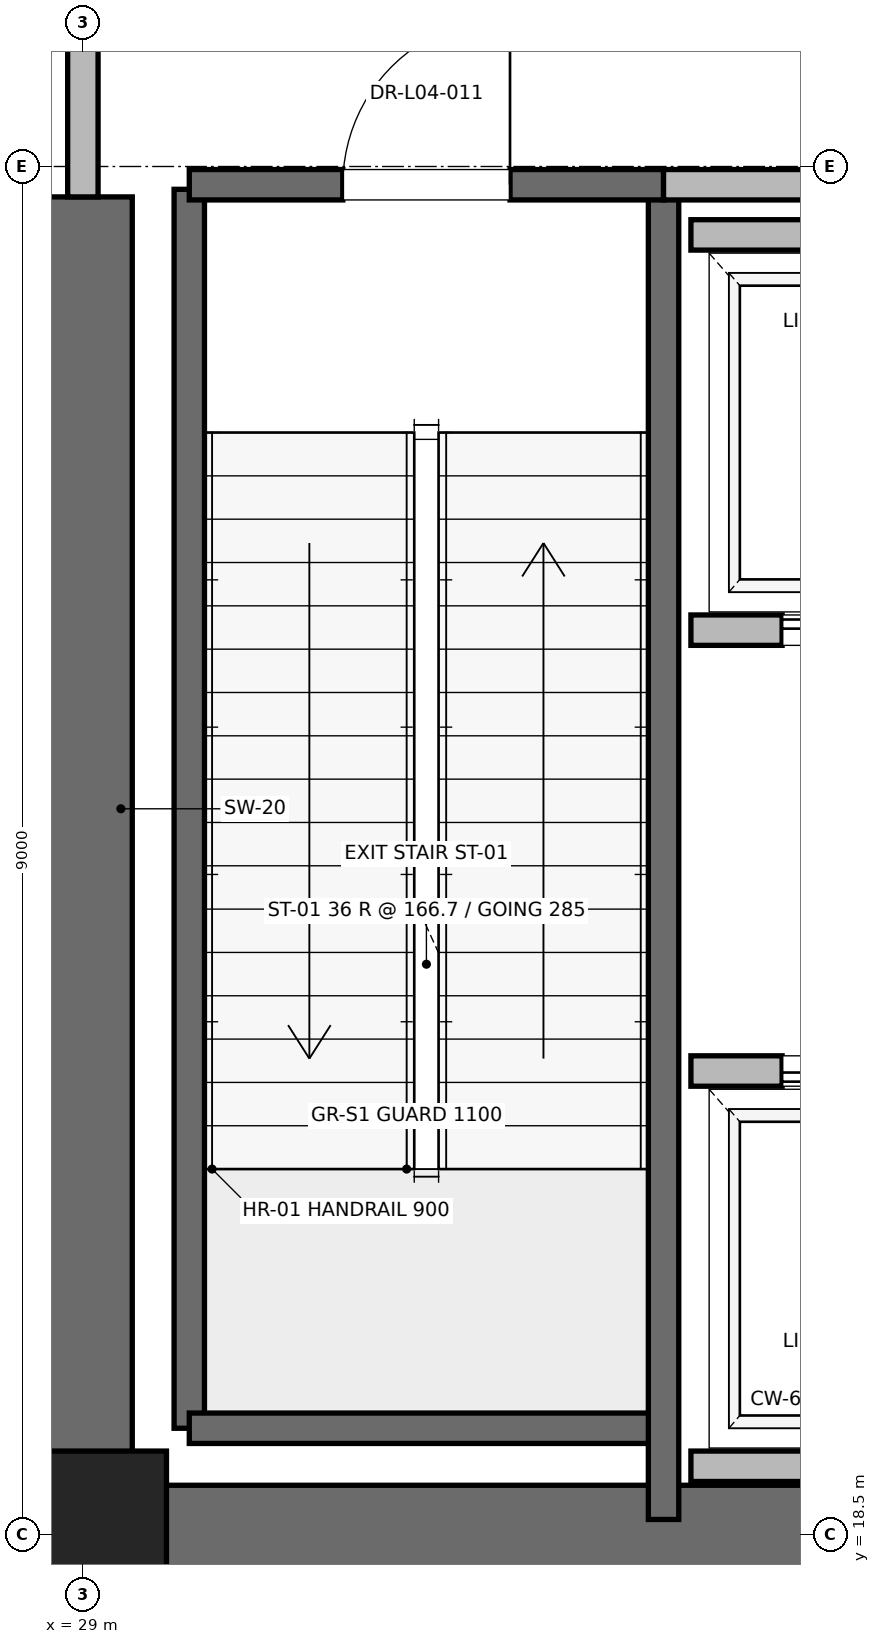
"""IFC4 building model, lengths in metres.
Left out: names, types, materials, properties, quantities, classifications, styles, units other than length and angle.
Written with IfcOpenShell. Run it as: python <this file> out.ifc"""

import sys

from ifc_helpers import new_model, si_unit, direction, frame, frame_2d, origin, origin_2d, place, context, subcontext, project, spatial, rectangle, extrude, element, fill, save


model = new_model("IFC4")
c1 = context("Model", 3, precision=1e-05, world=origin(), true_north=direction((0.0, 1.0)))
c2 = subcontext(c1, "Body", "Model", "MODEL_VIEW")
j1 = project(units=[si_unit("LENGTHUNIT", "METRE"), si_unit("PLANEANGLEUNIT", "RADIAN")], contexts=[c1])
p1 = place(None, origin())
s1 = spatial("IfcSite", under=j1, at=p1, CompositionType="ELEMENT")
p2 = place(p1, origin())
s2 = spatial("IfcBuilding", under=s1, at=p2, CompositionType="ELEMENT")
p3 = place(p2, frame((0.0, 0.0, 21.6)))
s3 = spatial("IfcBuildingStorey", under=s2, at=p3, CompositionType="ELEMENT", Elevation=21.6)
p4 = place(p3, frame((29.0, 18.5, 0.0), z_axis=(0.0, 0.0, 1.0), x_axis=(1.0, 0.0, 0.0)))
e1 = element("IfcColumn", 1, at=p4, inside=s3, PredefinedType="PILASTER", context=c2, shape_type="SweptSolid", body=[
    extrude(rectangle(XDim=1.1, YDim=1.1, at=origin_2d()), origin(), (0.0, 0.0, 1.0), 6.0),
])
p5 = place(p3, frame((29.0, 18.5, 0.0), z_axis=(0.0, 0.0, 1.0), x_axis=(1.0, 0.0, 0.0)))
e2 = element("IfcWall", 2, at=p5, inside=s3, PredefinedType="SHEAR", context=c2, shape_type="SweptSolid", body=[
    extrude(rectangle(XDim=9.2, YDim=0.65, at=frame_2d((4.6, 0.0))), origin(), (0.0, 0.0, 1.0), 5.76),
])
p6 = place(p3, frame((29.0, 18.5, 0.0), z_axis=(0.0, 0.0, 1.0), x_axis=(0.0, 1.0, 0.0)))
e3 = element("IfcWall", 3, at=p6, inside=s3, PredefinedType="SHEAR", context=c2, shape_type="SweptSolid", body=[
    extrude(rectangle(XDim=8.8, YDim=0.65, at=frame_2d((4.4, 0.0))), origin(), (0.0, 0.0, 1.0), 5.76),
])
p7 = place(p3, frame((29.7, 19.2, 0.0), z_axis=(0.0, 0.0, 1.0), x_axis=(0.0, 1.0, 0.0)))
e4 = element("IfcWall", 4, at=p7, inside=s3, PredefinedType="SOLIDWALL", context=c2, shape_type="SweptSolid", body=[
    extrude(rectangle(XDim=8.15, YDim=0.2, at=frame_2d((4.075, 0.0))), origin(), (0.0, 0.0, 1.0), 5.76),
])
p8 = place(p3, frame((29.7, 19.2, 0.0), z_axis=(0.0, 0.0, 1.0), x_axis=(1.0, 0.0, 0.0)))
e5 = element("IfcWall", 5, at=p8, inside=s3, PredefinedType="SOLIDWALL", context=c2, shape_type="SweptSolid", body=[
    extrude(rectangle(XDim=3.12, YDim=0.2, at=frame_2d((1.56, 0.0))), origin(), (0.0, 0.0, 1.0), 5.76),
])
p9 = place(p3, frame((32.82, 18.6, 0.0), z_axis=(0.0, 0.0, 1.0), x_axis=(0.0, 1.0, 0.0)))
e6 = element("IfcWall", 6, at=p9, inside=s3, PredefinedType="SOLIDWALL", context=c2, shape_type="SweptSolid", body=[
    extrude(rectangle(XDim=8.78, YDim=0.2, at=frame_2d((4.39, 0.0))), origin(), (0.0, 0.0, 1.0), 5.76),
])
p10 = place(p3, frame((29.7, 27.38, 0.0), z_axis=(0.0, 0.0, 1.0), x_axis=(1.0, 0.0, 0.0)))
e7 = element("IfcWall", 7, at=p10, inside=s3, PredefinedType="SOLIDWALL", context=c2, shape_type="SweptSolid", body=[
    extrude(rectangle(XDim=3.12, YDim=0.2, at=frame_2d((1.56, 0.0))), origin(), (0.0, 0.0, 1.0), 5.76),
])
p11 = place(p10, frame((1.01, 0.0, 0.0)))
e8 = element("IfcOpeningElement", 8, at=p11, cuts=e7, PredefinedType="OPENING", context=c2, shape_type="SweptSolid", body=[
    extrude(rectangle(XDim=1.1, YDim=2.15, at=frame_2d((0.55, 1.075))), frame((0.0, 0.1, 0.0), z_axis=(0.0, -1.0, 0.0), x_axis=(1.0, 0.0, 0.0)), (0.0, 0.0, 1.0), 0.2),
])
p12 = place(p3, frame((29.0, 27.3, 0.0), z_axis=(0.0, 0.0, 1.0), x_axis=(0.0, 1.0, 0.0)))
e9 = element("IfcWall", 9, at=p12, inside=s3, PredefinedType="PARTITIONING", context=c2, shape_type="SweptSolid", body=[
    extrude(rectangle(XDim=3.4, YDim=0.2, at=frame_2d((1.7, 0.0))), origin(), (0.0, 0.0, 1.0), 4.54),
])
p13 = place(p12, frame((1.125, 0.0, 0.0)))
e10 = element("IfcOpeningElement", 10, at=p13, cuts=e9, PredefinedType="OPENING", context=c2, shape_type="SweptSolid", body=[
    extrude(rectangle(XDim=1.15, YDim=2.2, at=frame_2d((0.575, 1.1))), frame((0.0, 0.1, 0.0), z_axis=(0.0, -1.0, 0.0), x_axis=(1.0, 0.0, 0.0)), (0.0, 0.0, 1.0), 0.2),
])
p14 = place(p3, frame((32.82, 27.38, 0.0), z_axis=(0.0, 0.0, 1.0), x_axis=(1.0, 0.0, 0.0)))
e11 = element("IfcWall", 11, at=p14, inside=s3, PredefinedType="PARTITIONING", context=c2, shape_type="SweptSolid", body=[
    extrude(rectangle(XDim=5.62, YDim=0.2, at=frame_2d((2.81, 0.0))), origin(), (0.0, 0.0, 1.0), 5.76),
])
p15 = place(p3, frame((33.0, 18.95, 0.0), z_axis=(0.0, 0.0, 1.0), x_axis=(1.0, 0.0, 0.0)))
e12 = element("IfcWall", 12, at=p15, inside=s3, PredefinedType="SOLIDWALL", context=c2, shape_type="SweptSolid", body=[
    extrude(rectangle(XDim=2.3, YDim=0.2, at=frame_2d((1.15, 0.0))), origin(), (0.0, 0.0, 1.0), 5.76),
])
p16 = place(p3, frame((35.3, 21.55, 0.0), z_axis=(0.0, 0.0, 1.0), x_axis=(-1.0, 0.0, 0.0)))
e13 = element("IfcWall", 13, at=p16, inside=s3, PredefinedType="SOLIDWALL", context=c2, shape_type="SweptSolid", body=[
    extrude(rectangle(XDim=2.3, YDim=0.2, at=frame_2d((1.15, 0.0))), origin(), (0.0, 0.0, 1.0), 5.76),
])
p17 = place(p16, frame((0.6, 0.0, 0.0)))
e14 = element("IfcOpeningElement", 14, at=p17, cuts=e13, PredefinedType="OPENING", context=c2, shape_type="SweptSolid", body=[
    extrude(rectangle(XDim=1.1, YDim=2.2, at=frame_2d((0.55, 1.1))), frame((0.0, 0.1, 0.0), z_axis=(0.0, -1.0, 0.0), x_axis=(1.0, 0.0, 0.0)), (0.0, 0.0, 1.0), 0.2),
])
p18 = place(p3, frame((33.0, 24.45, 0.0), z_axis=(0.0, 0.0, 1.0), x_axis=(1.0, 0.0, 0.0)))
e15 = element("IfcWall", 15, at=p18, inside=s3, PredefinedType="SOLIDWALL", context=c2, shape_type="SweptSolid", body=[
    extrude(rectangle(XDim=2.3, YDim=0.2, at=frame_2d((1.15, 0.0))), origin(), (0.0, 0.0, 1.0), 5.76),
])
p19 = place(p18, frame((0.6, 0.0, 0.0)))
e16 = element("IfcOpeningElement", 16, at=p19, cuts=e15, PredefinedType="OPENING", context=c2, shape_type="SweptSolid", body=[
    extrude(rectangle(XDim=1.1, YDim=2.2, at=frame_2d((0.55, 1.1))), frame((0.0, 0.1, 0.0), z_axis=(0.0, -1.0, 0.0), x_axis=(1.0, 0.0, 0.0)), (0.0, 0.0, 1.0), 0.2),
])
p20 = place(p3, frame((35.3, 27.05, 0.0), z_axis=(0.0, 0.0, 1.0), x_axis=(-1.0, 0.0, 0.0)))
e17 = element("IfcWall", 17, at=p20, inside=s3, PredefinedType="SOLIDWALL", context=c2, shape_type="SweptSolid", body=[
    extrude(rectangle(XDim=2.3, YDim=0.2, at=frame_2d((1.15, 0.0))), origin(), (0.0, 0.0, 1.0), 5.76),
])
p21 = place(p11, origin())
e18 = element("IfcDoor", 18, at=p21, inside=s3, OperationType="SINGLE_SWING_RIGHT", PredefinedType="DOOR", context=c2, shape_type="SweptSolid", body=[
    extrude(rectangle(XDim=1.1, YDim=2.15, at=frame_2d((0.55, 1.075))), frame((0.0, 0.025, 0.0), z_axis=(0.0, -1.0, 0.0), x_axis=(1.0, 0.0, 0.0)), (0.0, 0.0, 1.0), 0.05),
])
fill(e8, e18)
p22 = place(p17, origin())
e19 = element("IfcDoor", 19, at=p22, inside=s3, OperationType="SLIDING_TO_RIGHT", PredefinedType="DOOR", context=c2, shape_type="SweptSolid", body=[
    extrude(rectangle(XDim=1.1, YDim=2.2, at=frame_2d((0.55, 1.1))), frame((0.0, 0.025, 0.0), z_axis=(0.0, -1.0, 0.0), x_axis=(1.0, 0.0, 0.0)), (0.0, 0.0, 1.0), 0.05),
])
fill(e14, e19)
p23 = place(p19, origin())
e20 = element("IfcDoor", 20, at=p23, inside=s3, OperationType="SLIDING_TO_RIGHT", PredefinedType="DOOR", context=c2, shape_type="SweptSolid", body=[
    extrude(rectangle(XDim=1.1, YDim=2.2, at=frame_2d((0.55, 1.1))), frame((0.0, 0.025, 0.0), z_axis=(0.0, -1.0, 0.0), x_axis=(1.0, 0.0, 0.0)), (0.0, 0.0, 1.0), 0.05),
])
fill(e16, e20)
save(model, sys.argv[1])
